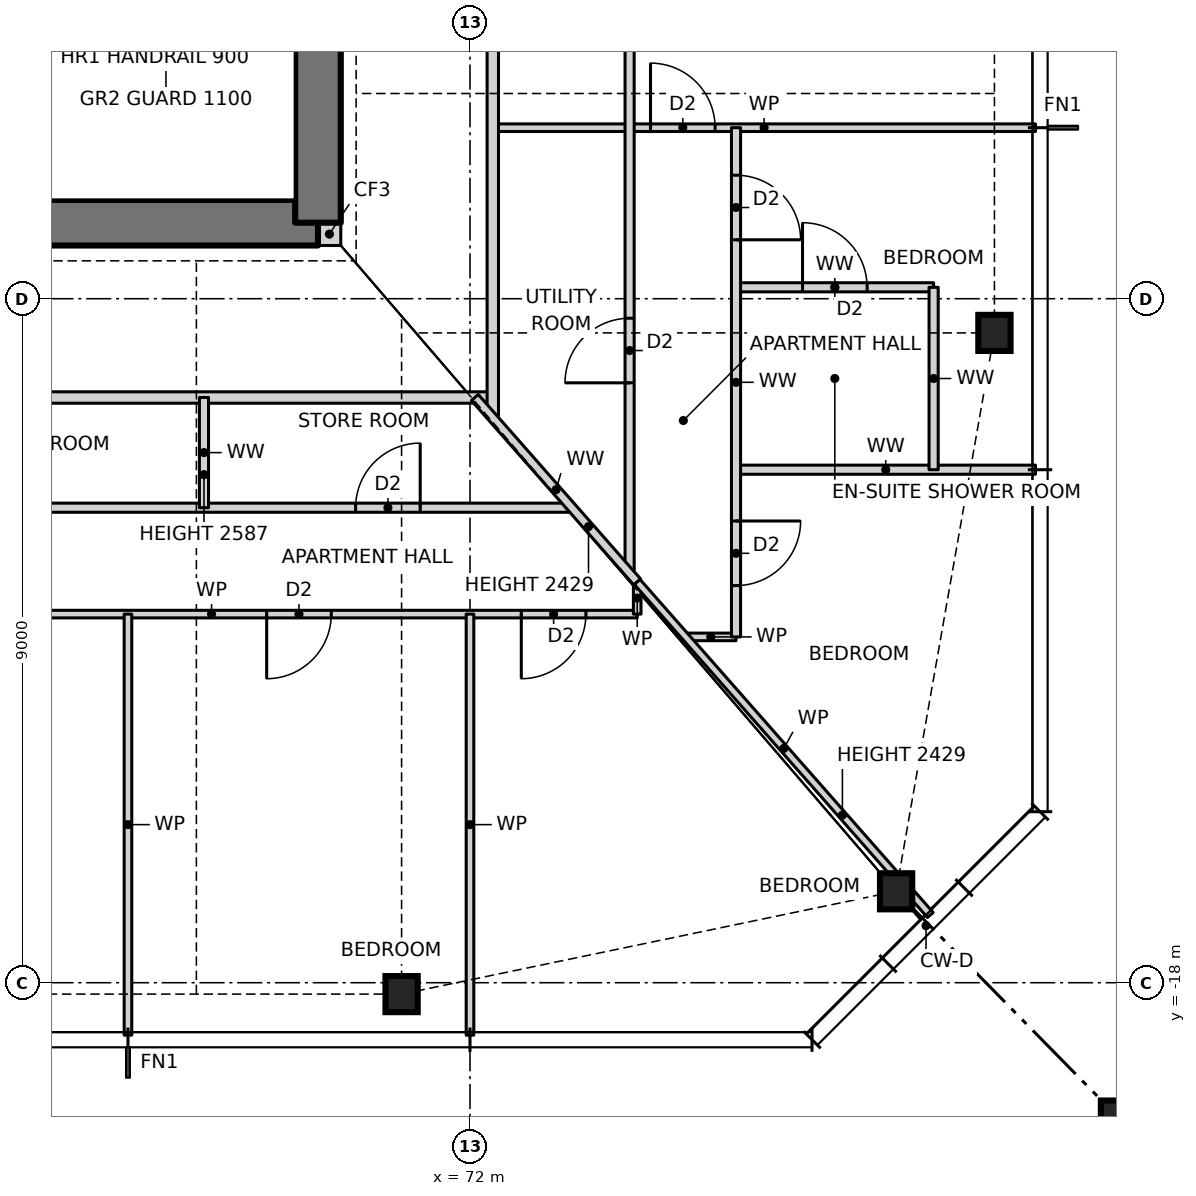
"""IFC4 building model, lengths in metres.
Left out: names, types, materials, properties, quantities, classifications, styles, units other than length and angle.
Written with IfcOpenShell. Run it as: python <this file> out.ifc"""

import sys

from ifc_helpers import new_model, si_unit, direction, frame, frame_2d, origin, origin_2d, place, context, subcontext, project, spatial, rectangle, hollow_rectangle, i_section, extrude, element, fill, save


model = new_model("IFC4")
c1 = context("Model", 3, precision=1e-05, world=origin(), true_north=direction((0.0, 1.0)))
c2 = subcontext(c1, "Body", "Model", "MODEL_VIEW")
j1 = project(units=[si_unit("LENGTHUNIT", "METRE"), si_unit("PLANEANGLEUNIT", "RADIAN")], contexts=[c1])
p1 = place(None, origin())
s1 = spatial("IfcSite", under=j1, at=p1, CompositionType="ELEMENT")
p2 = place(p1, origin())
s2 = spatial("IfcBuilding", under=s1, at=p2, CompositionType="ELEMENT")
p3 = place(p2, frame((0.0, 0.0, 50.0)))
s3 = spatial("IfcBuildingStorey", under=s2, at=p3, CompositionType="ELEMENT", Elevation=50.0)
for number, where, z_axis, x_axis in (
    (1, (71.1, -18.15, 0.0), (0.0, 0.0, 1.0), (1.0, 0.0, 0.0)),
    (2, (77.606, -16.797, 0.0), (0.0, 0.0, 1.0), (1.0, 0.0, 0.0)),
    (3, (78.9, -9.45, 0.0), (0.0, 0.0, 1.0), (1.0, 0.0, 0.0)),
):
    element("IfcColumn", number, at=place(p3, frame(where, z_axis=z_axis, x_axis=x_axis)), inside=s3, PredefinedType="COLUMN", context=c2, shape_type="SweptSolid", body=[
        extrude(i_section(OverallWidth=0.424, OverallDepth=0.475, WebThickness=0.048, FlangeThickness=0.077, at=origin_2d()), origin(), (0.0, 0.0, 1.0), 3.5),
    ])
p4 = place(p3, frame((80.9, -20.15, 0.0), z_axis=(0.0, 0.0, 1.0), x_axis=(1.0, 0.0, 0.0)))
e4 = element("IfcColumn", 4, at=p4, inside=s3, PredefinedType="COLUMN", context=c2, shape_type="SweptSolid", body=[
    extrude(hollow_rectangle(XDim=1.2, YDim=1.2, WallThickness=0.07, at=origin_2d()), origin(), (0.0, 0.0, 1.0), 3.5),
])
p5 = place(p3, frame((70.0, -8.15, 0.0), z_axis=(0.0, 0.0, 1.0), x_axis=(1.0, 0.0, 0.0)))
e5 = element("IfcWall", 5, at=p5, inside=s3, PredefinedType="SOLIDWALL", context=c2, shape_type="SweptSolid", body=[
    extrude(rectangle(XDim=0.3, YDim=0.3, at=frame_2d((0.15, 0.0))), origin(), (0.0, 0.0, 1.0), 3.5),
])
p6 = place(p3, frame((56.0, -8.0, 0.0), z_axis=(0.0, 0.0, 1.0), x_axis=(1.0, 0.0, 0.0)))
e6 = element("IfcWall", 6, at=p6, inside=s3, PredefinedType="SHEAR", context=c2, shape_type="SweptSolid", body=[
    extrude(rectangle(XDim=14.0, YDim=0.6, at=frame_2d((7.0, 0.0))), origin(), (0.0, 0.0, 1.0), 3.5),
])
p7 = place(p6, frame((2.7, 0.0, 0.0)))
e7 = element("IfcOpeningElement", 7, at=p7, cuts=e6, PredefinedType="OPENING", context=c2, shape_type="SweptSolid", body=[
    extrude(rectangle(XDim=0.9, YDim=2.1, at=frame_2d((0.45, 1.05))), frame((0.0, 0.31, 0.0), z_axis=(0.0, -1.0, 0.0), x_axis=(1.0, 0.0, 0.0)), (0.0, 0.0, 1.0), 0.62),
])
p8 = place(p6, frame((7.7, 0.0, 0.0)))
e8 = element("IfcOpeningElement", 8, at=p8, cuts=e6, PredefinedType="OPENING", context=c2, shape_type="SweptSolid", body=[
    extrude(rectangle(XDim=0.9, YDim=2.1, at=frame_2d((0.45, 1.05))), frame((0.0, 0.31, 0.0), z_axis=(0.0, -1.0, 0.0), x_axis=(1.0, 0.0, 0.0)), (0.0, 0.0, 1.0), 0.62),
])
p9 = place(p3, frame((70.0, -8.0, 0.0), z_axis=(0.0, 0.0, 1.0), x_axis=(0.0, 1.0, 0.0)))
e9 = element("IfcWall", 9, at=p9, inside=s3, PredefinedType="SHEAR", context=c2, shape_type="SweptSolid", body=[
    extrude(rectangle(XDim=16.0, YDim=0.6, at=frame_2d((8.0, 0.0))), origin(), (0.0, 0.0, 1.0), 3.5),
])
p10 = place(p9, frame((7.5, 0.0, 0.0)))
e10 = element("IfcOpeningElement", 10, at=p10, cuts=e9, PredefinedType="OPENING", context=c2, shape_type="SweptSolid", body=[
    extrude(rectangle(XDim=1.0, YDim=2.1, at=frame_2d((0.5, 1.05))), frame((0.0, 0.31, 0.0), z_axis=(0.0, -1.0, 0.0), x_axis=(1.0, 0.0, 0.0)), (0.0, 0.0, 1.0), 0.62),
])
p11 = place(p3, frame((74.836, -13.45, 0.0), z_axis=(0.0, 0.0, 1.0), x_axis=(1.0, 0.0, 0.0)))
e11 = element("IfcWall", 11, at=p11, inside=s3, PredefinedType="PARTITIONING", context=c2, shape_type="SweptSolid", body=[
    extrude(rectangle(XDim=0.664, YDim=0.1, at=frame_2d((0.332, 0.0))), origin(), (0.0, 0.0, 1.0), 3.27),
])
p12 = place(p3, frame((63.0, -13.15, 0.0), z_axis=(0.0, 0.0, 1.0), x_axis=(1.0, 0.0, 0.0)))
e12 = element("IfcWall", 12, at=p12, inside=s3, PredefinedType="PARTITIONING", context=c2, shape_type="SweptSolid", body=[
    extrude(rectangle(XDim=11.2, YDim=0.1, at=frame_2d((5.6, 0.0))), origin(), (0.0, 0.0, 1.0), 3.27),
])
p13 = place(p12, frame((1.825, 0.0, 0.0)))
e13 = element("IfcOpeningElement", 13, at=p13, cuts=e12, PredefinedType="OPENING", context=c2, shape_type="SweptSolid", body=[
    extrude(rectangle(XDim=0.85, YDim=2.1, at=frame_2d((0.425, 1.05))), frame((0.0, 0.06, 0.0), z_axis=(0.0, -1.0, 0.0), x_axis=(1.0, 0.0, 0.0)), (0.0, 0.0, 1.0), 0.12),
])
p14 = place(p12, frame((6.325, 0.0, 0.0)))
e14 = element("IfcOpeningElement", 14, at=p14, cuts=e12, PredefinedType="OPENING", context=c2, shape_type="SweptSolid", body=[
    extrude(rectangle(XDim=0.85, YDim=2.1, at=frame_2d((0.425, 1.05))), frame((0.0, 0.06, 0.0), z_axis=(0.0, -1.0, 0.0), x_axis=(1.0, 0.0, 0.0)), (0.0, 0.0, 1.0), 0.12),
])
p15 = place(p12, frame((9.675, 0.0, 0.0)))
e15 = element("IfcOpeningElement", 15, at=p15, cuts=e12, PredefinedType="OPENING", context=c2, shape_type="SweptSolid", body=[
    extrude(rectangle(XDim=0.85, YDim=2.1, at=frame_2d((0.425, 1.05))), frame((0.0, 0.06, 0.0), z_axis=(0.0, -1.0, 0.0), x_axis=(1.0, 0.0, 0.0)), (0.0, 0.0, 1.0), 0.12),
])
p16 = place(p3, frame((54.0, -11.75, 0.0), z_axis=(0.0, 0.0, 1.0), x_axis=(1.0, 0.0, 0.0)))
e16 = element("IfcWall", 16, at=p16, inside=s3, PredefinedType="PARTITIONING", context=c2, shape_type="SweptSolid", body=[
    extrude(rectangle(XDim=19.34, YDim=0.12, at=frame_2d((9.67, 0.0))), origin(), (0.0, 0.0, 1.0), 3.27),
])
p17 = place(p16, frame((1.375, 0.0, 0.0)))
e17 = element("IfcOpeningElement", 17, at=p17, cuts=e16, PredefinedType="OPENING", context=c2, shape_type="SweptSolid", body=[
    extrude(rectangle(XDim=0.85, YDim=2.1, at=frame_2d((0.425, 1.05))), frame((0.0, 0.07, 0.0), z_axis=(0.0, -1.0, 0.0), x_axis=(1.0, 0.0, 0.0)), (0.0, 0.0, 1.0), 0.14),
])
p18 = place(p16, frame((4.575, 0.0, 0.0)))
e18 = element("IfcOpeningElement", 18, at=p18, cuts=e16, PredefinedType="OPENING", context=c2, shape_type="SweptSolid", body=[
    extrude(rectangle(XDim=0.85, YDim=2.1, at=frame_2d((0.425, 1.05))), frame((0.0, 0.07, 0.0), z_axis=(0.0, -1.0, 0.0), x_axis=(1.0, 0.0, 0.0)), (0.0, 0.0, 1.0), 0.14),
])
p19 = place(p16, frame((11.325, 0.0, 0.0)))
e19 = element("IfcOpeningElement", 19, at=p19, cuts=e16, PredefinedType="OPENING", context=c2, shape_type="SweptSolid", body=[
    extrude(rectangle(XDim=0.85, YDim=2.1, at=frame_2d((0.425, 1.05))), frame((0.0, 0.07, 0.0), z_axis=(0.0, -1.0, 0.0), x_axis=(1.0, 0.0, 0.0)), (0.0, 0.0, 1.0), 0.14),
])
p20 = place(p16, frame((16.495, 0.0, 0.0)))
e20 = element("IfcOpeningElement", 20, at=p20, cuts=e16, PredefinedType="OPENING", context=c2, shape_type="SweptSolid", body=[
    extrude(rectangle(XDim=0.85, YDim=2.1, at=frame_2d((0.425, 1.05))), frame((0.0, 0.07, 0.0), z_axis=(0.0, -1.0, 0.0), x_axis=(1.0, 0.0, 0.0)), (0.0, 0.0, 1.0), 0.14),
])
p21 = place(p3, frame((75.5, -11.25, 0.0), z_axis=(0.0, 0.0, 1.0), x_axis=(1.0, 0.0, 0.0)))
e21 = element("IfcWall", 21, at=p21, inside=s3, PredefinedType="PARTITIONING", context=c2, shape_type="SweptSolid", body=[
    extrude(rectangle(XDim=3.94, YDim=0.12, at=frame_2d((1.97, 0.0))), origin(), (0.0, 0.0, 1.0), 3.27),
])
p22 = place(p3, frame((53.7, -10.3, 0.0), z_axis=(0.0, 0.0, 1.0), x_axis=(1.0, 0.0, 0.0)))
e22 = element("IfcWall", 22, at=p22, inside=s3, PredefinedType="PARTITIONING", context=c2, shape_type="SweptSolid", body=[
    extrude(rectangle(XDim=18.6, YDim=0.15, at=frame_2d((9.3, 0.0))), origin(), (0.0, 0.0, 1.0), 3.27),
])
p23 = place(p22, frame((4.8, 0.0, 0.0)))
e23 = element("IfcOpeningElement", 23, at=p23, cuts=e22, PredefinedType="OPENING", context=c2, shape_type="SweptSolid", body=[
    extrude(rectangle(XDim=1.0, YDim=2.1, at=frame_2d((0.5, 1.05))), frame((0.0, 0.085, 0.0), z_axis=(0.0, -1.0, 0.0), x_axis=(1.0, 0.0, 0.0)), (0.0, 0.0, 1.0), 0.17),
])
p24 = place(p3, frame((75.5, -8.85, 0.0), z_axis=(0.0, 0.0, 1.0), x_axis=(1.0, 0.0, 0.0)))
e24 = element("IfcWall", 24, at=p24, inside=s3, PredefinedType="PARTITIONING", context=c2, shape_type="SweptSolid", body=[
    extrude(rectangle(XDim=2.6, YDim=0.12, at=frame_2d((1.3, 0.0))), origin(), (0.0, 0.0, 1.0), 3.27),
])
p25 = place(p24, frame((0.875, 0.0, 0.0)))
e25 = element("IfcOpeningElement", 25, at=p25, cuts=e24, PredefinedType="OPENING", context=c2, shape_type="SweptSolid", body=[
    extrude(rectangle(XDim=0.85, YDim=2.1, at=frame_2d((0.425, 1.05))), frame((0.0, 0.07, 0.0), z_axis=(0.0, -1.0, 0.0), x_axis=(1.0, 0.0, 0.0)), (0.0, 0.0, 1.0), 0.14),
])
p26 = place(p3, frame((72.3, -6.75, 0.0), z_axis=(0.0, 0.0, 1.0), x_axis=(1.0, 0.0, 0.0)))
e26 = element("IfcWall", 26, at=p26, inside=s3, PredefinedType="PARTITIONING", context=c2, shape_type="SweptSolid", body=[
    extrude(rectangle(XDim=7.14, YDim=0.1, at=frame_2d((3.57, 0.0))), origin(), (0.0, 0.0, 1.0), 3.27),
])
p27 = place(p26, frame((2.075, 0.0, 0.0)))
e27 = element("IfcOpeningElement", 27, at=p27, cuts=e26, PredefinedType="OPENING", context=c2, shape_type="SweptSolid", body=[
    extrude(rectangle(XDim=0.85, YDim=2.1, at=frame_2d((0.425, 1.05))), frame((0.0, 0.06, 0.0), z_axis=(0.0, -1.0, 0.0), x_axis=(1.0, 0.0, 0.0)), (0.0, 0.0, 1.0), 0.12),
])
p28 = place(p3, frame((78.1, -11.25, 0.0), z_axis=(0.0, 0.0, 1.0), x_axis=(0.0, 1.0, 0.0)))
e28 = element("IfcWall", 28, at=p28, inside=s3, PredefinedType="PARTITIONING", context=c2, shape_type="SweptSolid", body=[
    extrude(rectangle(XDim=2.4, YDim=0.12, at=frame_2d((1.2, 0.0))), origin(), (0.0, 0.0, 1.0), 3.27),
])
p29 = place(p3, frame((75.5, -13.45, 0.0), z_axis=(0.0, 0.0, 1.0), x_axis=(0.0, 1.0, 0.0)))
e29 = element("IfcWall", 29, at=p29, inside=s3, PredefinedType="PARTITIONING", context=c2, shape_type="SweptSolid", body=[
    extrude(rectangle(XDim=6.7, YDim=0.12, at=frame_2d((3.35, 0.0))), origin(), (0.0, 0.0, 1.0), 3.27),
])
p30 = place(p29, frame((5.225, 0.0, 0.0)))
e30 = element("IfcOpeningElement", 30, at=p30, cuts=e29, PredefinedType="OPENING", context=c2, shape_type="SweptSolid", body=[
    extrude(rectangle(XDim=0.85, YDim=2.1, at=frame_2d((0.425, 1.05))), frame((0.0, 0.07, 0.0), z_axis=(0.0, -1.0, 0.0), x_axis=(1.0, 0.0, 0.0)), (0.0, 0.0, 1.0), 0.14),
])
p31 = place(p29, frame((0.675, 0.0, 0.0)))
e31 = element("IfcOpeningElement", 31, at=p31, cuts=e29, PredefinedType="OPENING", context=c2, shape_type="SweptSolid", body=[
    extrude(rectangle(XDim=0.85, YDim=2.1, at=frame_2d((0.425, 1.05))), frame((0.0, 0.07, 0.0), z_axis=(0.0, -1.0, 0.0), x_axis=(1.0, 0.0, 0.0)), (0.0, 0.0, 1.0), 0.14),
])
p32 = place(p3, frame((74.2, -13.15, 0.0), z_axis=(0.0, 0.0, 1.0), x_axis=(0.0, 1.0, 0.0)))
e32 = element("IfcWall", 32, at=p32, inside=s3, PredefinedType="PARTITIONING", context=c2, shape_type="SweptSolid", body=[
    extrude(rectangle(XDim=0.423, YDim=0.1, at=frame_2d((0.211, 0.0))), origin(), (0.0, 0.0, 1.0), 3.27),
])
p33 = place(p3, frame((74.1, -12.614, 0.0), z_axis=(0.0, 0.0, 1.0), x_axis=(0.0, 1.0, 0.0)))
e33 = element("IfcWall", 33, at=p33, inside=s3, PredefinedType="PARTITIONING", context=c2, shape_type="SweptSolid", body=[
    extrude(rectangle(XDim=25.228, YDim=0.12, at=frame_2d((12.614, 0.0))), origin(), (0.0, 0.0, 1.0), 3.27),
])
p34 = place(p33, frame((7.239, 0.0, 0.0)))
e34 = element("IfcOpeningElement", 34, at=p34, cuts=e33, PredefinedType="OPENING", context=c2, shape_type="SweptSolid", body=[
    extrude(rectangle(XDim=0.85, YDim=2.1, at=frame_2d((0.425, 1.05))), frame((0.0, 0.07, 0.0), z_axis=(0.0, -1.0, 0.0), x_axis=(1.0, 0.0, 0.0)), (0.0, 0.0, 1.0), 0.14),
])
p35 = place(p33, frame((10.439, 0.0, 0.0)))
e35 = element("IfcOpeningElement", 35, at=p35, cuts=e33, PredefinedType="OPENING", context=c2, shape_type="SweptSolid", body=[
    extrude(rectangle(XDim=0.85, YDim=2.1, at=frame_2d((0.425, 1.05))), frame((0.0, 0.07, 0.0), z_axis=(0.0, -1.0, 0.0), x_axis=(1.0, 0.0, 0.0)), (0.0, 0.0, 1.0), 0.14),
])
p36 = place(p33, frame((2.507, 0.0, 0.0)))
e36 = element("IfcOpeningElement", 36, at=p36, cuts=e33, PredefinedType="OPENING", context=c2, shape_type="SweptSolid", body=[
    extrude(rectangle(XDim=0.85, YDim=2.1, at=frame_2d((0.425, 1.05))), frame((0.0, 0.07, 0.0), z_axis=(0.0, -1.0, 0.0), x_axis=(1.0, 0.0, 0.0)), (0.0, 0.0, 1.0), 0.14),
])
p37 = place(p33, frame((16.639, 0.0, 0.0)))
e37 = element("IfcOpeningElement", 37, at=p37, cuts=e33, PredefinedType="OPENING", context=c2, shape_type="SweptSolid", body=[
    extrude(rectangle(XDim=0.85, YDim=2.1, at=frame_2d((0.425, 1.05))), frame((0.0, 0.07, 0.0), z_axis=(0.0, -1.0, 0.0), x_axis=(1.0, 0.0, 0.0)), (0.0, 0.0, 1.0), 0.14),
])
p38 = place(p33, frame((21.821, 0.0, 0.0)))
e38 = element("IfcOpeningElement", 38, at=p38, cuts=e33, PredefinedType="OPENING", context=c2, shape_type="SweptSolid", body=[
    extrude(rectangle(XDim=0.85, YDim=2.1, at=frame_2d((0.425, 1.05))), frame((0.0, 0.07, 0.0), z_axis=(0.0, -1.0, 0.0), x_axis=(1.0, 0.0, 0.0)), (0.0, 0.0, 1.0), 0.14),
])
p39 = place(p3, frame((72.3, -10.568, 0.0), z_axis=(0.0, 0.0, 1.0), x_axis=(0.0, 1.0, 0.0)))
e39 = element("IfcWall", 39, at=p39, inside=s3, PredefinedType="PARTITIONING", context=c2, shape_type="SweptSolid", body=[
    extrude(rectangle(XDim=21.136, YDim=0.15, at=frame_2d((10.568, 0.0))), origin(), (0.0, 0.0, 1.0), 3.27),
])
p40 = place(p39, frame((8.318, 0.0, 0.0)))
e40 = element("IfcOpeningElement", 40, at=p40, cuts=e39, PredefinedType="OPENING", context=c2, shape_type="SweptSolid", body=[
    extrude(rectangle(XDim=1.0, YDim=2.1, at=frame_2d((0.5, 1.05))), frame((0.0, 0.085, 0.0), z_axis=(0.0, -1.0, 0.0), x_axis=(1.0, 0.0, 0.0)), (0.0, 0.0, 1.0), 0.17),
])
p41 = place(p3, frame((72.0, -18.69, 0.0), z_axis=(0.0, 0.0, 1.0), x_axis=(0.0, 1.0, 0.0)))
e41 = element("IfcWall", 41, at=p41, inside=s3, PredefinedType="PARTITIONING", context=c2, shape_type="SweptSolid", body=[
    extrude(rectangle(XDim=5.54, YDim=0.1, at=frame_2d((2.77, 0.0))), origin(), (0.0, 0.0, 1.0), 3.27),
])
p42 = place(p3, frame((68.5, -11.75, 0.0), z_axis=(0.0, 0.0, 1.0), x_axis=(0.0, 1.0, 0.0)))
e42 = element("IfcWall", 42, at=p42, inside=s3, PredefinedType="PARTITIONING", context=c2, shape_type="SweptSolid", body=[
    extrude(rectangle(XDim=1.45, YDim=0.12, at=frame_2d((0.725, 0.0))), origin(), (0.0, 0.0, 1.0), 2.587),
])
p43 = place(p3, frame((67.5, -18.69, 0.0), z_axis=(0.0, 0.0, 1.0), x_axis=(0.0, 1.0, 0.0)))
e43 = element("IfcWall", 43, at=p43, inside=s3, PredefinedType="PARTITIONING", context=c2, shape_type="SweptSolid", body=[
    extrude(rectangle(XDim=5.54, YDim=0.1, at=frame_2d((2.77, 0.0))), origin(), (0.0, 0.0, 1.0), 3.27),
])
p44 = place(p3, frame((74.2, -12.727, 0.0), z_axis=(0.0, 0.0, 1.0), x_axis=(-0.660667046586, 0.75067906162, 0.0)))
e44 = element("IfcWall", 44, at=p44, inside=s3, PredefinedType="PARTITIONING", context=c2, shape_type="SweptSolid", body=[
    extrude(rectangle(XDim=3.233, YDim=0.12, at=frame_2d((1.617, 0.0))), origin(), (0.0, 0.0, 1.0), 2.429),
])
p45 = place(p3, frame((78.057, -17.109, 0.0), z_axis=(0.0, 0.0, 1.0), x_axis=(-0.660698595885, 0.750651294141, 0.0)))
e45 = element("IfcWall", 45, at=p45, inside=s3, PredefinedType="PARTITIONING", context=c2, shape_type="SweptSolid", body=[
    extrude(rectangle(XDim=5.838, YDim=0.1, at=frame_2d((2.919, 0.0))), origin(), (0.0, 0.0, 1.0), 2.429),
])
p46 = place(p14, frame((0.85, 0.0, 0.0), z_axis=(0.0, 0.0, 1.0), x_axis=(-1.0, 0.0, 0.0)))
e46 = element("IfcDoor", 46, at=p46, inside=s3, OperationType="SINGLE_SWING_RIGHT", PredefinedType="DOOR", context=c2, shape_type="SweptSolid", body=[
    extrude(rectangle(XDim=0.85, YDim=2.1, at=frame_2d((0.425, 1.05))), frame((0.0, 0.025, 0.0), z_axis=(0.0, -1.0, 0.0), x_axis=(1.0, 0.0, 0.0)), (0.0, 0.0, 1.0), 0.05),
])
fill(e14, e46)
p47 = place(p15, frame((0.85, 0.0, 0.0), z_axis=(0.0, 0.0, 1.0), x_axis=(-1.0, 0.0, 0.0)))
e47 = element("IfcDoor", 47, at=p47, inside=s3, OperationType="SINGLE_SWING_RIGHT", PredefinedType="DOOR", context=c2, shape_type="SweptSolid", body=[
    extrude(rectangle(XDim=0.85, YDim=2.1, at=frame_2d((0.425, 1.05))), frame((0.0, 0.025, 0.0), z_axis=(0.0, -1.0, 0.0), x_axis=(1.0, 0.0, 0.0)), (0.0, 0.0, 1.0), 0.05),
])
fill(e15, e47)
p48 = place(p20, origin())
e48 = element("IfcDoor", 48, at=p48, inside=s3, OperationType="SINGLE_SWING_RIGHT", PredefinedType="DOOR", context=c2, shape_type="SweptSolid", body=[
    extrude(rectangle(XDim=0.85, YDim=2.1, at=frame_2d((0.425, 1.05))), frame((0.0, 0.025, 0.0), z_axis=(0.0, -1.0, 0.0), x_axis=(1.0, 0.0, 0.0)), (0.0, 0.0, 1.0), 0.05),
])
fill(e20, e48)
p49 = place(p27, origin())
e49 = element("IfcDoor", 49, at=p49, inside=s3, OperationType="SINGLE_SWING_LEFT", PredefinedType="DOOR", context=c2, shape_type="SweptSolid", body=[
    extrude(rectangle(XDim=0.85, YDim=2.1, at=frame_2d((0.425, 1.05))), frame((0.0, 0.025, 0.0), z_axis=(0.0, -1.0, 0.0), x_axis=(1.0, 0.0, 0.0)), (0.0, 0.0, 1.0), 0.05),
])
fill(e27, e49)
p50 = place(p25, origin())
e50 = element("IfcDoor", 50, at=p50, inside=s3, OperationType="SINGLE_SWING_LEFT", PredefinedType="DOOR", context=c2, shape_type="SweptSolid", body=[
    extrude(rectangle(XDim=0.85, YDim=2.1, at=frame_2d((0.425, 1.05))), frame((0.0, 0.025, 0.0), z_axis=(0.0, -1.0, 0.0), x_axis=(1.0, 0.0, 0.0)), (0.0, 0.0, 1.0), 0.05),
])
fill(e25, e50)
p51 = place(p30, frame((0.85, 0.0, 0.0), z_axis=(0.0, 0.0, 1.0), x_axis=(-1.0, 0.0, 0.0)))
e51 = element("IfcDoor", 51, at=p51, inside=s3, OperationType="SINGLE_SWING_RIGHT", PredefinedType="DOOR", context=c2, shape_type="SweptSolid", body=[
    extrude(rectangle(XDim=0.85, YDim=2.1, at=frame_2d((0.425, 1.05))), frame((0.0, 0.025, 0.0), z_axis=(0.0, -1.0, 0.0), x_axis=(1.0, 0.0, 0.0)), (0.0, 0.0, 1.0), 0.05),
])
fill(e30, e51)
p52 = place(p31, frame((0.85, 0.0, 0.0), z_axis=(0.0, 0.0, 1.0), x_axis=(-1.0, 0.0, 0.0)))
e52 = element("IfcDoor", 52, at=p52, inside=s3, OperationType="SINGLE_SWING_LEFT", PredefinedType="DOOR", context=c2, shape_type="SweptSolid", body=[
    extrude(rectangle(XDim=0.85, YDim=2.1, at=frame_2d((0.425, 1.05))), frame((0.0, 0.025, 0.0), z_axis=(0.0, -1.0, 0.0), x_axis=(1.0, 0.0, 0.0)), (0.0, 0.0, 1.0), 0.05),
])
fill(e31, e52)
p53 = place(p36, origin())
e53 = element("IfcDoor", 53, at=p53, inside=s3, OperationType="SINGLE_SWING_LEFT", PredefinedType="DOOR", context=c2, shape_type="SweptSolid", body=[
    extrude(rectangle(XDim=0.85, YDim=2.1, at=frame_2d((0.425, 1.05))), frame((0.0, 0.025, 0.0), z_axis=(0.0, -1.0, 0.0), x_axis=(1.0, 0.0, 0.0)), (0.0, 0.0, 1.0), 0.05),
])
fill(e36, e53)
save(model, sys.argv[1])
